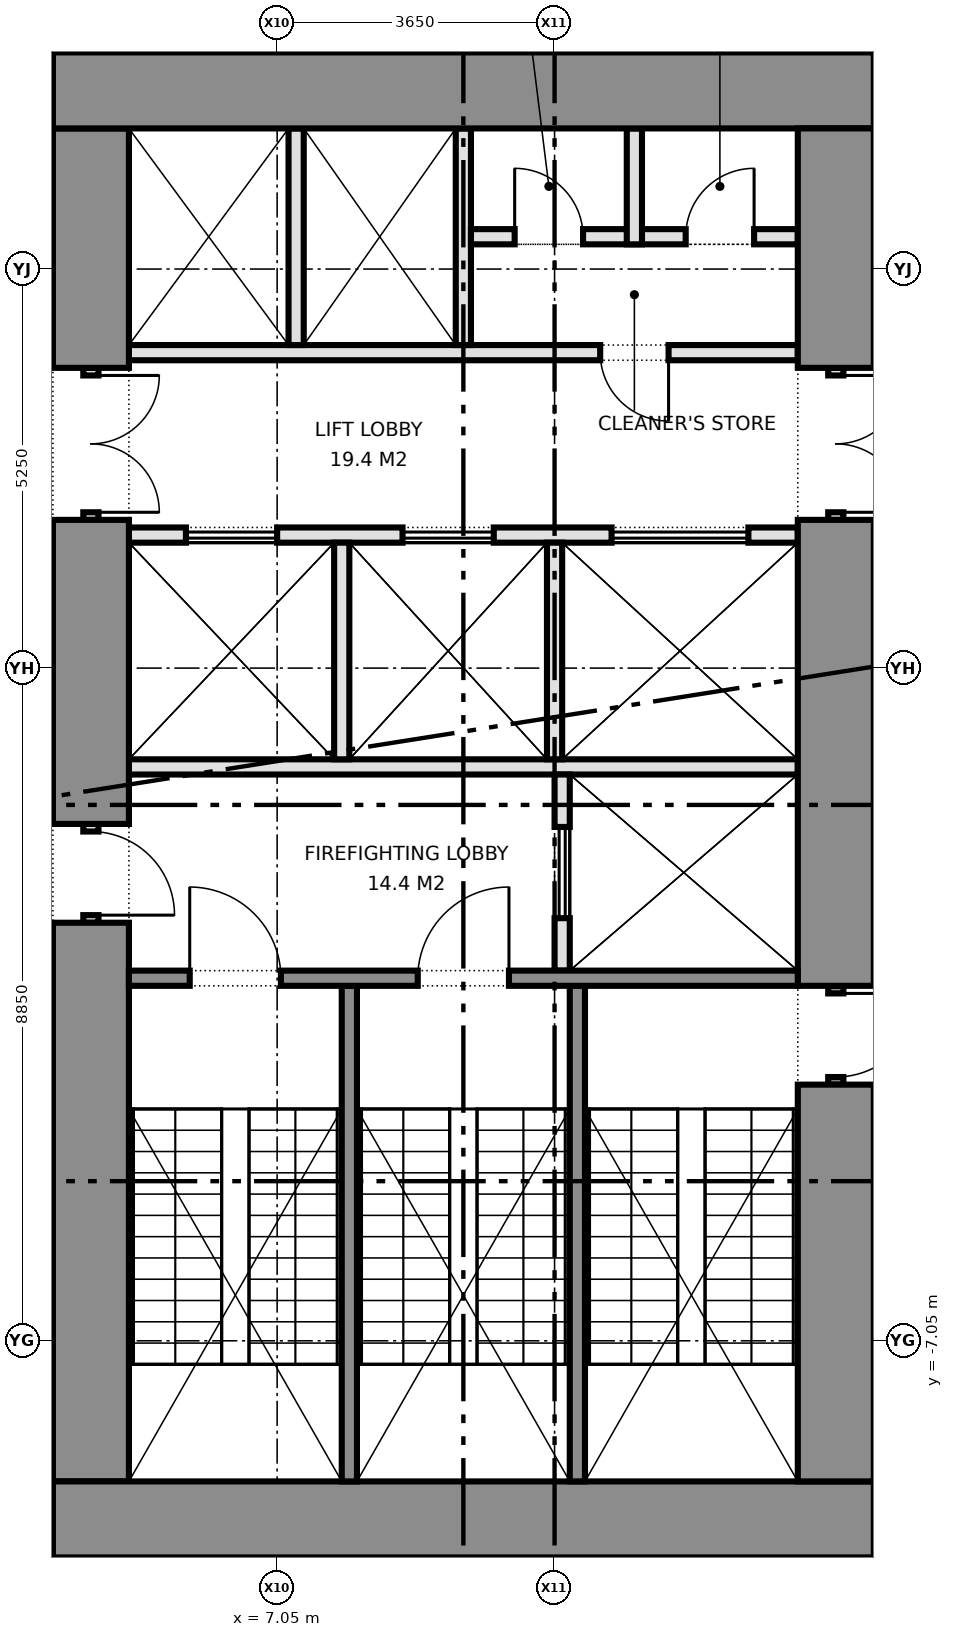
"""IFC4 building model, lengths in metres.
Left out: names, types, materials, properties, quantities, classifications, styles, units other than length and angle.
Written with IfcOpenShell. Run it as: python <this file> out.ifc"""

import sys

from ifc_helpers import new_model, si_unit, direction, frame, frame_2d, origin, place, context, subcontext, project, spatial, rectangle, extrude, element, fill, save


model = new_model("IFC4")
c1 = context("Model", 3, precision=1e-05, world=origin(), true_north=direction((0.0, 1.0)))
c2 = subcontext(c1, "Body", "Model", "MODEL_VIEW")
j1 = project(units=[si_unit("LENGTHUNIT", "METRE"), si_unit("PLANEANGLEUNIT", "RADIAN")], contexts=[c1])
p1 = place(None, origin())
s1 = spatial("IfcSite", under=j1, at=p1, CompositionType="ELEMENT")
p2 = place(p1, origin())
s2 = spatial("IfcBuilding", under=s1, at=p2, CompositionType="ELEMENT")
p3 = place(p2, frame((0.0, 0.0, 108.4)))
s3 = spatial("IfcBuildingStorey", under=s2, at=p3, CompositionType="ELEMENT", Elevation=108.4)
for number, where, z_axis, x_axis in (
    (1, (14.9, 9.4, 0.0), (0.0, 0.0, 1.0), (-1.0, 0.0, 0.0)),
    (2, (14.9, -9.4, 0.0), (0.0, 0.0, 1.0), (-1.0, 0.0, 0.0)),
):
    element("IfcWall", number, at=place(p3, frame(where, z_axis=z_axis, x_axis=x_axis)), inside=s3, PredefinedType="SHEAR", context=c2, shape_type="SweptSolid", body=[
        extrude(rectangle(XDim=10.8, YDim=1.0, at=frame_2d((5.4, 0.0))), origin(), (0.0, 0.0, 1.0), 4.15),
    ])
p4 = place(p3, frame((14.4, 8.9, 0.0), z_axis=(0.0, 0.0, 1.0), x_axis=(0.0, -1.0, 0.0)))
e3 = element("IfcWall", 3, at=p4, inside=s3, PredefinedType="SHEAR", context=c2, shape_type="SweptSolid", body=[
    extrude(rectangle(XDim=3.15, YDim=1.0, at=frame_2d((1.575, 0.0))), origin(), (0.0, 0.0, 1.0), 4.15),
])
p5 = place(p3, frame((14.4, 5.75, 0.0), z_axis=(0.0, 0.0, 1.0), x_axis=(0.0, -1.0, 0.0)))
e4 = element("IfcWall", 4, at=p5, inside=s3, PredefinedType="PARTITIONING", context=c2, shape_type="SweptSolid", body=[
    extrude(rectangle(XDim=2.0, YDim=0.2, at=frame_2d((1.0, 0.0))), origin(), (0.0, 0.0, 1.0), 2.4),
])
p6 = place(p5, frame((0.1, 0.0, 0.0)))
e5 = element("IfcOpeningElement", 5, at=p6, cuts=e4, PredefinedType="OPENING", context=c2, shape_type="SweptSolid", body=[
    extrude(rectangle(XDim=1.8, YDim=2.1, at=frame_2d((0.9, 1.05))), frame((0.0, 0.11, 0.0), z_axis=(0.0, -1.0, 0.0), x_axis=(1.0, 0.0, 0.0)), (0.0, 0.0, 1.0), 0.22),
])
p7 = place(p3, frame((14.4, 3.75, 0.0), z_axis=(0.0, 0.0, 1.0), x_axis=(0.0, -1.0, 0.0)))
e6 = element("IfcWall", 6, at=p7, inside=s3, PredefinedType="SHEAR", context=c2, shape_type="SweptSolid", body=[
    extrude(rectangle(XDim=6.13, YDim=1.0, at=frame_2d((3.065, 0.0))), origin(), (0.0, 0.0, 1.0), 4.15),
])
p8 = place(p3, frame((14.4, -2.38, 0.0), z_axis=(0.0, 0.0, 1.0), x_axis=(0.0, -1.0, 0.0)))
e7 = element("IfcWall", 7, at=p8, inside=s3, PredefinedType="SHEAR", context=c2, shape_type="SweptSolid", body=[
    extrude(rectangle(XDim=1.3, YDim=0.2, at=frame_2d((0.65, 0.0))), origin(), (0.0, 0.0, 1.0), 2.4),
])
p9 = place(p8, frame((0.1, 0.0, 0.0)))
e8 = element("IfcOpeningElement", 8, at=p9, cuts=e7, PredefinedType="OPENING", context=c2, shape_type="SweptSolid", body=[
    extrude(rectangle(XDim=1.1, YDim=2.1, at=frame_2d((0.55, 1.05))), frame((0.0, 0.11, 0.0), z_axis=(0.0, -1.0, 0.0), x_axis=(1.0, 0.0, 0.0)), (0.0, 0.0, 1.0), 0.22),
])
p10 = place(p3, frame((14.4, -3.68, 0.0), z_axis=(0.0, 0.0, 1.0), x_axis=(0.0, -1.0, 0.0)))
e9 = element("IfcWall", 9, at=p10, inside=s3, PredefinedType="SHEAR", context=c2, shape_type="SweptSolid", body=[
    extrude(rectangle(XDim=5.22, YDim=1.0, at=frame_2d((2.61, 0.0))), origin(), (0.0, 0.0, 1.0), 4.15),
])
p11 = place(p3, frame((4.6, 8.9, 0.0), z_axis=(0.0, 0.0, 1.0), x_axis=(0.0, -1.0, 0.0)))
e10 = element("IfcWall", 10, at=p11, inside=s3, PredefinedType="SHEAR", context=c2, shape_type="SweptSolid", body=[
    extrude(rectangle(XDim=3.15, YDim=1.0, at=frame_2d((1.575, 0.0))), origin(), (0.0, 0.0, 1.0), 4.15),
])
p12 = place(p3, frame((4.6, 5.75, 0.0), z_axis=(0.0, 0.0, 1.0), x_axis=(0.0, -1.0, 0.0)))
e11 = element("IfcWall", 11, at=p12, inside=s3, PredefinedType="PARTITIONING", context=c2, shape_type="SweptSolid", body=[
    extrude(rectangle(XDim=2.0, YDim=0.2, at=frame_2d((1.0, 0.0))), origin(), (0.0, 0.0, 1.0), 2.4),
])
p13 = place(p12, frame((0.1, 0.0, 0.0)))
e12 = element("IfcOpeningElement", 12, at=p13, cuts=e11, PredefinedType="OPENING", context=c2, shape_type="SweptSolid", body=[
    extrude(rectangle(XDim=1.8, YDim=2.1, at=frame_2d((0.9, 1.05))), frame((0.0, 0.11, 0.0), z_axis=(0.0, -1.0, 0.0), x_axis=(1.0, 0.0, 0.0)), (0.0, 0.0, 1.0), 0.22),
])
p14 = place(p3, frame((4.6, 3.75, 0.0), z_axis=(0.0, 0.0, 1.0), x_axis=(0.0, -1.0, 0.0)))
e13 = element("IfcWall", 13, at=p14, inside=s3, PredefinedType="SHEAR", context=c2, shape_type="SweptSolid", body=[
    extrude(rectangle(XDim=4.0, YDim=1.0, at=frame_2d((2.0, 0.0))), origin(), (0.0, 0.0, 1.0), 4.15),
])
p15 = place(p3, frame((4.6, -0.25, 0.0), z_axis=(0.0, 0.0, 1.0), x_axis=(0.0, -1.0, 0.0)))
e14 = element("IfcWall", 14, at=p15, inside=s3, PredefinedType="PARTITIONING", context=c2, shape_type="SweptSolid", body=[
    extrude(rectangle(XDim=1.3, YDim=0.2, at=frame_2d((0.65, 0.0))), origin(), (0.0, 0.0, 1.0), 2.4),
])
p16 = place(p15, frame((0.1, 0.0, 0.0)))
e15 = element("IfcOpeningElement", 15, at=p16, cuts=e14, PredefinedType="OPENING", context=c2, shape_type="SweptSolid", body=[
    extrude(rectangle(XDim=1.1, YDim=2.1, at=frame_2d((0.55, 1.05))), frame((0.0, 0.11, 0.0), z_axis=(0.0, -1.0, 0.0), x_axis=(1.0, 0.0, 0.0)), (0.0, 0.0, 1.0), 0.22),
])
p17 = place(p3, frame((4.6, -1.55, 0.0), z_axis=(0.0, 0.0, 1.0), x_axis=(0.0, -1.0, 0.0)))
e16 = element("IfcWall", 16, at=p17, inside=s3, PredefinedType="SHEAR", context=c2, shape_type="SweptSolid", body=[
    extrude(rectangle(XDim=7.35, YDim=1.0, at=frame_2d((3.675, 0.0))), origin(), (0.0, 0.0, 1.0), 4.15),
])
p18 = place(p3, frame((13.9, 5.95, 0.0), z_axis=(0.0, 0.0, 1.0), x_axis=(-1.0, 0.0, 0.0)))
e17 = element("IfcWall", 17, at=p18, inside=s3, PredefinedType="PARTITIONING", context=c2, shape_type="SweptSolid", body=[
    extrude(rectangle(XDim=8.8, YDim=0.2, at=frame_2d((4.4, 0.0))), origin(), (0.0, 0.0, 1.0), 4.15),
])
p19 = place(p18, frame((1.7, 0.0, 0.0)))
e18 = element("IfcOpeningElement", 18, at=p19, cuts=e17, PredefinedType="OPENING", context=c2, shape_type="SweptSolid", body=[
    extrude(rectangle(XDim=0.9, YDim=2.1, at=frame_2d((0.45, 1.05))), frame((0.0, 0.11, 0.0), z_axis=(0.0, -1.0, 0.0), x_axis=(1.0, 0.0, 0.0)), (0.0, 0.0, 1.0), 0.22),
])
p20 = place(p3, frame((13.9, 3.55, 0.0), z_axis=(0.0, 0.0, 1.0), x_axis=(-1.0, 0.0, 0.0)))
e19 = element("IfcWall", 19, at=p20, inside=s3, PredefinedType="PARTITIONING", context=c2, shape_type="SweptSolid", body=[
    extrude(rectangle(XDim=8.8, YDim=0.2, at=frame_2d((4.4, 0.0))), origin(), (0.0, 0.0, 1.0), 4.15),
])
p21 = place(p20, frame((0.65, 0.0, 0.0)))
e20 = element("IfcOpeningElement", 20, at=p21, cuts=e19, PredefinedType="OPENING", context=c2, shape_type="SweptSolid", body=[
    extrude(rectangle(XDim=1.8, YDim=2.1, at=frame_2d((0.9, 1.05))), frame((0.0, 0.11, 0.0), z_axis=(0.0, -1.0, 0.0), x_axis=(1.0, 0.0, 0.0)), (0.0, 0.0, 1.0), 0.22),
])
p22 = place(p20, frame((4.0, 0.0, 0.0)))
e21 = element("IfcOpeningElement", 21, at=p22, cuts=e19, PredefinedType="OPENING", context=c2, shape_type="SweptSolid", body=[
    extrude(rectangle(XDim=1.2, YDim=2.1, at=frame_2d((0.6, 1.05))), frame((0.0, 0.11, 0.0), z_axis=(0.0, -1.0, 0.0), x_axis=(1.0, 0.0, 0.0)), (0.0, 0.0, 1.0), 0.22),
])
p23 = place(p20, frame((6.85, 0.0, 0.0)))
e22 = element("IfcOpeningElement", 22, at=p23, cuts=e19, PredefinedType="OPENING", context=c2, shape_type="SweptSolid", body=[
    extrude(rectangle(XDim=1.2, YDim=2.1, at=frame_2d((0.6, 1.05))), frame((0.0, 0.11, 0.0), z_axis=(0.0, -1.0, 0.0), x_axis=(1.0, 0.0, 0.0)), (0.0, 0.0, 1.0), 0.22),
])
p24 = place(p3, frame((13.9, 0.5, 0.0), z_axis=(0.0, 0.0, 1.0), x_axis=(-1.0, 0.0, 0.0)))
e23 = element("IfcWall", 23, at=p24, inside=s3, PredefinedType="PARTITIONING", context=c2, shape_type="SweptSolid", body=[
    extrude(rectangle(XDim=8.8, YDim=0.2, at=frame_2d((4.4, 0.0))), origin(), (0.0, 0.0, 1.0), 4.15),
])
p25 = place(p3, frame((10.8, 0.4, 0.0), z_axis=(0.0, 0.0, 1.0), x_axis=(0.0, -1.0, 0.0)))
e24 = element("IfcWall", 24, at=p25, inside=s3, PredefinedType="PARTITIONING", context=c2, shape_type="SweptSolid", body=[
    extrude(rectangle(XDim=2.58, YDim=0.2, at=frame_2d((1.29, 0.0))), origin(), (0.0, 0.0, 1.0), 4.15),
])
p26 = place(p25, frame((0.69, 0.0, 0.0)))
e25 = element("IfcOpeningElement", 25, at=p26, cuts=e24, PredefinedType="OPENING", context=c2, shape_type="SweptSolid", body=[
    extrude(rectangle(XDim=1.2, YDim=2.1, at=frame_2d((0.6, 1.05))), frame((0.0, 0.11, 0.0), z_axis=(0.0, -1.0, 0.0), x_axis=(1.0, 0.0, 0.0)), (0.0, 0.0, 1.0), 0.22),
])
p27 = place(p3, frame((13.9, -2.28, 0.0), z_axis=(0.0, 0.0, 1.0), x_axis=(-1.0, 0.0, 0.0)))
e26 = element("IfcWall", 26, at=p27, inside=s3, PredefinedType="SHEAR", context=c2, shape_type="SweptSolid", body=[
    extrude(rectangle(XDim=8.8, YDim=0.2, at=frame_2d((4.4, 0.0))), origin(), (0.0, 0.0, 1.0), 4.15),
])
p28 = place(p27, frame((3.8, 0.0, 0.0)))
e27 = element("IfcOpeningElement", 27, at=p28, cuts=e26, PredefinedType="OPENING", context=c2, shape_type="SweptSolid", body=[
    extrude(rectangle(XDim=1.2, YDim=2.1, at=frame_2d((0.6, 1.05))), frame((0.0, 0.11, 0.0), z_axis=(0.0, -1.0, 0.0), x_axis=(1.0, 0.0, 0.0)), (0.0, 0.0, 1.0), 0.22),
])
p29 = place(p27, frame((6.8, 0.0, 0.0)))
e28 = element("IfcOpeningElement", 28, at=p29, cuts=e26, PredefinedType="OPENING", context=c2, shape_type="SweptSolid", body=[
    extrude(rectangle(XDim=1.2, YDim=2.1, at=frame_2d((0.6, 1.05))), frame((0.0, 0.11, 0.0), z_axis=(0.0, -1.0, 0.0), x_axis=(1.0, 0.0, 0.0)), (0.0, 0.0, 1.0), 0.22),
])
for number, where, z_axis, x_axis in (
    (29, (11.0, -2.38, 0.0), (0.0, 0.0, 1.0), (0.0, -1.0, 0.0)),
    (30, (8.0, -2.38, 0.0), (0.0, 0.0, 1.0), (0.0, -1.0, 0.0)),
):
    element("IfcWall", number, at=place(p3, frame(where, z_axis=z_axis, x_axis=x_axis)), inside=s3, PredefinedType="SHEAR", context=c2, shape_type="SweptSolid", body=[
        extrude(rectangle(XDim=6.52, YDim=0.2, at=frame_2d((3.26, 0.0))), origin(), (0.0, 0.0, 1.0), 4.15),
    ])
for number, where, z_axis, x_axis in (
    (31, (9.5, 8.9, 0.0), (0.0, 0.0, 1.0), (0.0, -1.0, 0.0)),
    (32, (7.3, 8.9, 0.0), (0.0, 0.0, 1.0), (0.0, -1.0, 0.0)),
):
    element("IfcWall", number, at=place(p3, frame(where, z_axis=z_axis, x_axis=x_axis)), inside=s3, PredefinedType="PARTITIONING", context=c2, shape_type="SweptSolid", body=[
        extrude(rectangle(XDim=2.85, YDim=0.2, at=frame_2d((1.425, 0.0))), origin(), (0.0, 0.0, 1.0), 4.15),
    ])
p30 = place(p3, frame((13.9, 7.475, 0.0), z_axis=(0.0, 0.0, 1.0), x_axis=(-1.0, 0.0, 0.0)))
e33 = element("IfcWall", 33, at=p30, inside=s3, PredefinedType="PARTITIONING", context=c2, shape_type="SweptSolid", body=[
    extrude(rectangle(XDim=4.3, YDim=0.2, at=frame_2d((2.15, 0.0))), origin(), (0.0, 0.0, 1.0), 4.15),
])
p31 = place(p30, frame((0.575, 0.0, 0.0)))
e34 = element("IfcOpeningElement", 34, at=p31, cuts=e33, PredefinedType="OPENING", context=c2, shape_type="SweptSolid", body=[
    extrude(rectangle(XDim=0.9, YDim=2.1, at=frame_2d((0.45, 1.05))), frame((0.0, 0.11, 0.0), z_axis=(0.0, -1.0, 0.0), x_axis=(1.0, 0.0, 0.0)), (0.0, 0.0, 1.0), 0.22),
])
p32 = place(p30, frame((2.825, 0.0, 0.0)))
e35 = element("IfcOpeningElement", 35, at=p32, cuts=e33, PredefinedType="OPENING", context=c2, shape_type="SweptSolid", body=[
    extrude(rectangle(XDim=0.9, YDim=2.1, at=frame_2d((0.45, 1.05))), frame((0.0, 0.11, 0.0), z_axis=(0.0, -1.0, 0.0), x_axis=(1.0, 0.0, 0.0)), (0.0, 0.0, 1.0), 0.22),
])
p33 = place(p3, frame((11.75, 8.9, 0.0), z_axis=(0.0, 0.0, 1.0), x_axis=(0.0, -1.0, 0.0)))
e36 = element("IfcWall", 36, at=p33, inside=s3, PredefinedType="PARTITIONING", context=c2, shape_type="SweptSolid", body=[
    extrude(rectangle(XDim=1.525, YDim=0.2, at=frame_2d((0.762, 0.0))), origin(), (0.0, 0.0, 1.0), 4.15),
])
for number, where, z_axis, x_axis in (
    (37, (10.7, 3.45, 0.0), (0.0, 0.0, 1.0), (0.0, -1.0, 0.0)),
    (38, (7.9, 3.45, 0.0), (0.0, 0.0, 1.0), (0.0, -1.0, 0.0)),
):
    element("IfcWall", number, at=place(p3, frame(where, z_axis=z_axis, x_axis=x_axis)), inside=s3, PredefinedType="PARTITIONING", context=c2, shape_type="SweptSolid", body=[
        extrude(rectangle(XDim=2.85, YDim=0.2, at=frame_2d((1.425, 0.0))), origin(), (0.0, 0.0, 1.0), 4.15),
    ])
p34 = place(p6, origin())
e39 = element("IfcDoor", 39, at=p34, inside=s3, OperationType="DOUBLE_DOOR_SINGLE_SWING", PredefinedType="DOOR", context=c2, shape_type="SweptSolid", body=[
    extrude(rectangle(XDim=1.8, YDim=2.1, at=frame_2d((0.9, 1.05))), frame((0.0, 0.025, 0.0), z_axis=(0.0, -1.0, 0.0), x_axis=(1.0, 0.0, 0.0)), (0.0, 0.0, 1.0), 0.05),
])
fill(e5, e39)
p35 = place(p9, origin())
e40 = element("IfcDoor", 40, at=p35, inside=s3, OperationType="SINGLE_SWING_LEFT", PredefinedType="DOOR", context=c2, shape_type="SweptSolid", body=[
    extrude(rectangle(XDim=1.1, YDim=2.1, at=frame_2d((0.55, 1.05))), frame((0.0, 0.025, 0.0), z_axis=(0.0, -1.0, 0.0), x_axis=(1.0, 0.0, 0.0)), (0.0, 0.0, 1.0), 0.05),
])
fill(e8, e40)
p36 = place(p13, origin())
e41 = element("IfcDoor", 41, at=p36, inside=s3, OperationType="DOUBLE_DOOR_SINGLE_SWING", PredefinedType="DOOR", context=c2, shape_type="SweptSolid", body=[
    extrude(rectangle(XDim=1.8, YDim=2.1, at=frame_2d((0.9, 1.05))), frame((0.0, 0.025, 0.0), z_axis=(0.0, -1.0, 0.0), x_axis=(1.0, 0.0, 0.0)), (0.0, 0.0, 1.0), 0.05),
])
fill(e12, e41)
p37 = place(p16, origin())
e42 = element("IfcDoor", 42, at=p37, inside=s3, OperationType="SINGLE_SWING_RIGHT", PredefinedType="DOOR", context=c2, shape_type="SweptSolid", body=[
    extrude(rectangle(XDim=1.1, YDim=2.1, at=frame_2d((0.55, 1.05))), frame((0.0, 0.025, 0.0), z_axis=(0.0, -1.0, 0.0), x_axis=(1.0, 0.0, 0.0)), (0.0, 0.0, 1.0), 0.05),
])
fill(e15, e42)
p38 = place(p21, origin())
e43 = element("IfcDoor", 43, at=p38, inside=s3, OperationType="DOUBLE_DOOR_SLIDING", PredefinedType="DOOR", context=c2, shape_type="SweptSolid", body=[
    extrude(rectangle(XDim=1.8, YDim=2.1, at=frame_2d((0.9, 1.05))), frame((0.0, 0.025, 0.0), z_axis=(0.0, -1.0, 0.0), x_axis=(1.0, 0.0, 0.0)), (0.0, 0.0, 1.0), 0.05),
])
fill(e20, e43)
p39 = place(p22, origin())
e44 = element("IfcDoor", 44, at=p39, inside=s3, OperationType="DOUBLE_DOOR_SLIDING", PredefinedType="DOOR", context=c2, shape_type="SweptSolid", body=[
    extrude(rectangle(XDim=1.2, YDim=2.1, at=frame_2d((0.6, 1.05))), frame((0.0, 0.025, 0.0), z_axis=(0.0, -1.0, 0.0), x_axis=(1.0, 0.0, 0.0)), (0.0, 0.0, 1.0), 0.05),
])
fill(e21, e44)
p40 = place(p23, origin())
e45 = element("IfcDoor", 45, at=p40, inside=s3, OperationType="DOUBLE_DOOR_SLIDING", PredefinedType="DOOR", context=c2, shape_type="SweptSolid", body=[
    extrude(rectangle(XDim=1.2, YDim=2.1, at=frame_2d((0.6, 1.05))), frame((0.0, 0.025, 0.0), z_axis=(0.0, -1.0, 0.0), x_axis=(1.0, 0.0, 0.0)), (0.0, 0.0, 1.0), 0.05),
])
fill(e22, e45)
p41 = place(p26, origin())
e46 = element("IfcDoor", 46, at=p41, inside=s3, OperationType="DOUBLE_DOOR_SLIDING", PredefinedType="DOOR", context=c2, shape_type="SweptSolid", body=[
    extrude(rectangle(XDim=1.2, YDim=2.1, at=frame_2d((0.6, 1.05))), frame((0.0, 0.025, 0.0), z_axis=(0.0, -1.0, 0.0), x_axis=(1.0, 0.0, 0.0)), (0.0, 0.0, 1.0), 0.05),
])
fill(e25, e46)
p42 = place(p19, origin())
e47 = element("IfcDoor", 47, at=p42, inside=s3, OperationType="SINGLE_SWING_LEFT", PredefinedType="DOOR", context=c2, shape_type="SweptSolid", body=[
    extrude(rectangle(XDim=0.9, YDim=2.1, at=frame_2d((0.45, 1.05))), frame((0.0, 0.025, 0.0), z_axis=(0.0, -1.0, 0.0), x_axis=(1.0, 0.0, 0.0)), (0.0, 0.0, 1.0), 0.05),
])
fill(e18, e47)
p43 = place(p31, frame((0.9, 0.0, 0.0), z_axis=(0.0, 0.0, 1.0), x_axis=(-1.0, 0.0, 0.0)))
e48 = element("IfcDoor", 48, at=p43, inside=s3, OperationType="SINGLE_SWING_RIGHT", PredefinedType="DOOR", context=c2, shape_type="SweptSolid", body=[
    extrude(rectangle(XDim=0.9, YDim=2.1, at=frame_2d((0.45, 1.05))), frame((0.0, 0.025, 0.0), z_axis=(0.0, -1.0, 0.0), x_axis=(1.0, 0.0, 0.0)), (0.0, 0.0, 1.0), 0.05),
])
fill(e34, e48)
p44 = place(p32, frame((0.9, 0.0, 0.0), z_axis=(0.0, 0.0, 1.0), x_axis=(-1.0, 0.0, 0.0)))
e49 = element("IfcDoor", 49, at=p44, inside=s3, OperationType="SINGLE_SWING_LEFT", PredefinedType="DOOR", context=c2, shape_type="SweptSolid", body=[
    extrude(rectangle(XDim=0.9, YDim=2.1, at=frame_2d((0.45, 1.05))), frame((0.0, 0.025, 0.0), z_axis=(0.0, -1.0, 0.0), x_axis=(1.0, 0.0, 0.0)), (0.0, 0.0, 1.0), 0.05),
])
fill(e35, e49)
p45 = place(p28, frame((1.2, 0.0, 0.0), z_axis=(0.0, 0.0, 1.0), x_axis=(-1.0, 0.0, 0.0)))
e50 = element("IfcDoor", 50, at=p45, inside=s3, OperationType="SINGLE_SWING_RIGHT", PredefinedType="DOOR", context=c2, shape_type="SweptSolid", body=[
    extrude(rectangle(XDim=1.2, YDim=2.1, at=frame_2d((0.6, 1.05))), frame((0.0, 0.025, 0.0), z_axis=(0.0, -1.0, 0.0), x_axis=(1.0, 0.0, 0.0)), (0.0, 0.0, 1.0), 0.05),
])
fill(e27, e50)
p46 = place(p29, frame((1.2, 0.0, 0.0), z_axis=(0.0, 0.0, 1.0), x_axis=(-1.0, 0.0, 0.0)))
e51 = element("IfcDoor", 51, at=p46, inside=s3, OperationType="SINGLE_SWING_LEFT", PredefinedType="DOOR", context=c2, shape_type="SweptSolid", body=[
    extrude(rectangle(XDim=1.2, YDim=2.1, at=frame_2d((0.6, 1.05))), frame((0.0, 0.025, 0.0), z_axis=(0.0, -1.0, 0.0), x_axis=(1.0, 0.0, 0.0)), (0.0, 0.0, 1.0), 0.05),
])
fill(e28, e51)
save(model, sys.argv[1])
